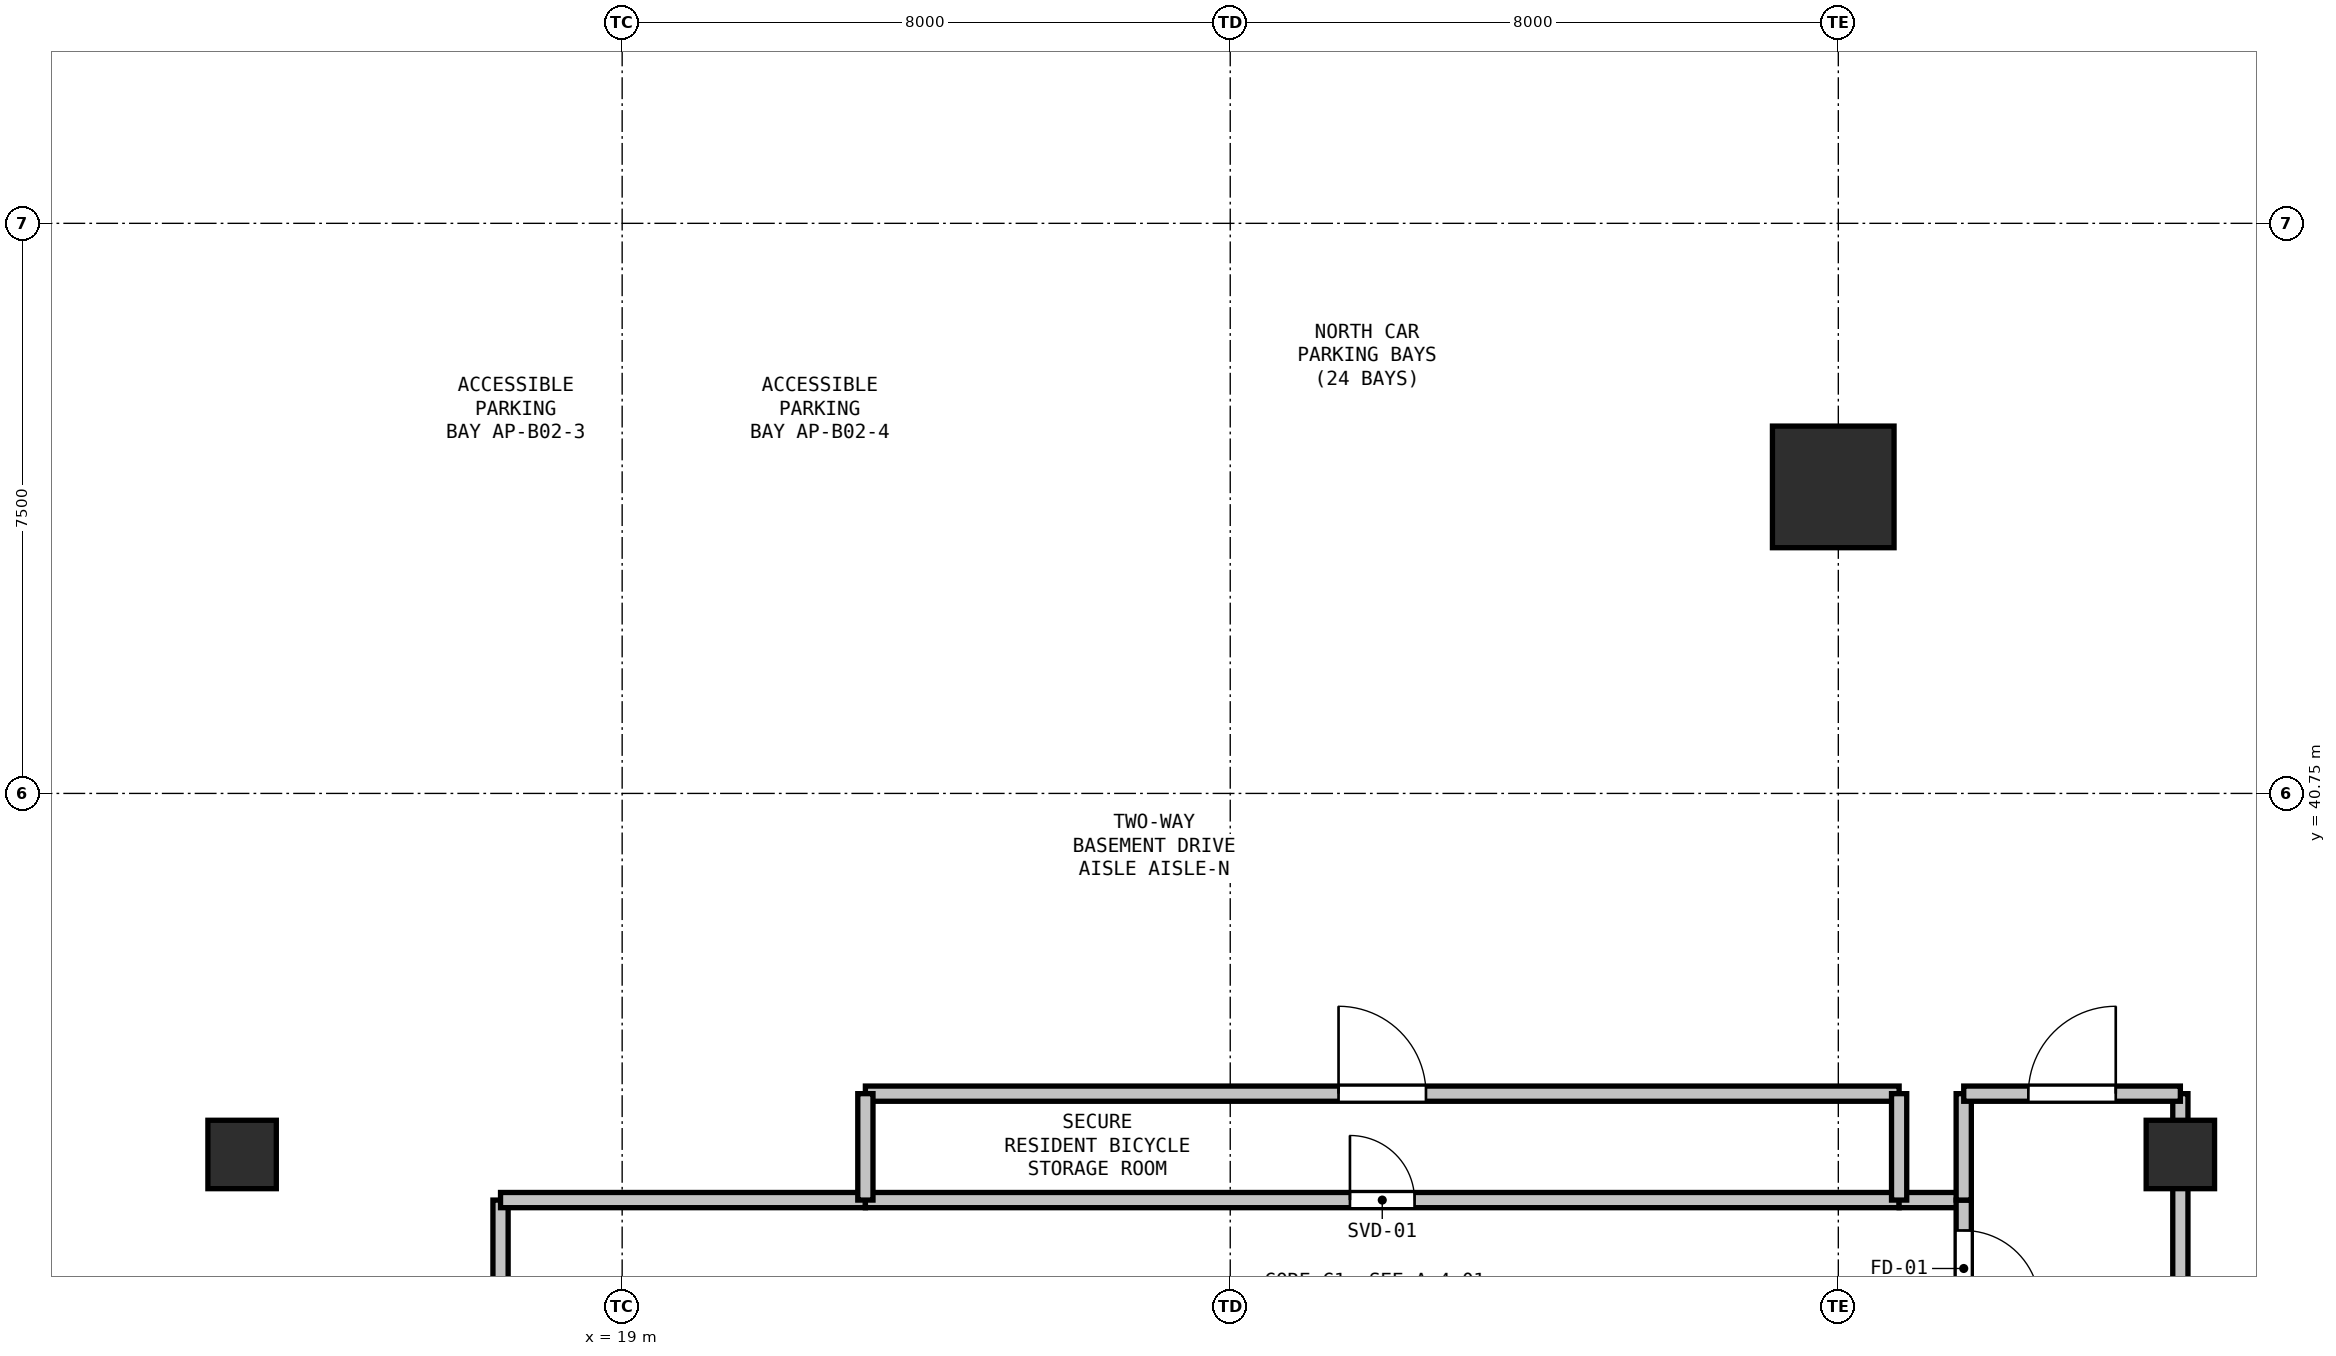
"""IFC4 building model, lengths in metres.
Left out: names, types, materials, properties, quantities, classifications, styles, units other than length and angle.
Written with IfcOpenShell. Run it as: python <this file> out.ifc"""

import sys

from ifc_helpers import new_model, si_unit, direction, frame, frame_2d, origin, origin_2d, place, context, subcontext, project, spatial, rectangle, hollow_rectangle, extrude, element, fill, save


model = new_model("IFC4")
c1 = context("Model", 3, precision=1e-05, world=origin(), true_north=direction((0.0, 1.0)))
c2 = subcontext(c1, "Body", "Model", "MODEL_VIEW")
j1 = project(units=[si_unit("LENGTHUNIT", "METRE"), si_unit("PLANEANGLEUNIT", "RADIAN")], contexts=[c1])
p1 = place(None, origin())
s1 = spatial("IfcSite", under=j1, at=p1, CompositionType="ELEMENT")
p2 = place(p1, origin())
s2 = spatial("IfcBuilding", under=s1, at=p2, CompositionType="ELEMENT")
p3 = place(p2, frame((0.0, 0.0, -9.0)))
s3 = spatial("IfcBuildingStorey", under=s2, at=p3, CompositionType="ELEMENT", Elevation=-9.0)
p4 = place(p3, frame((34.933, 44.783, 0.0), z_axis=(0.0, 0.0, 1.0), x_axis=(1.0, 0.0, 0.0)))
e1 = element("IfcColumn", 1, at=p4, inside=s3, PredefinedType="COLUMN", context=c2, shape_type="SweptSolid", body=[
    extrude(hollow_rectangle(XDim=1.6, YDim=1.6, WallThickness=0.04, at=origin_2d()), origin(), (0.0, 0.0, 1.0), 4.5),
])
for number, where, z_axis, x_axis in (
    (2, (14.0, 36.0, 0.0), (0.0, 0.0, 1.0), (1.0, 0.0, 0.0)),
    (3, (39.5, 36.0, 0.0), (0.0, 0.0, 1.0), (1.0, 0.0, 0.0)),
):
    element("IfcColumn", number, at=place(p3, frame(where, z_axis=z_axis, x_axis=x_axis)), inside=s3, PredefinedType="COLUMN", context=c2, shape_type="SweptSolid", body=[
        extrude(rectangle(XDim=0.9, YDim=0.9, at=origin_2d()), origin(), (0.0, 0.0, 1.0), 4.5),
    ])
p5 = place(p3, frame((17.4, 16.7, 0.0), z_axis=(0.0, 0.0, 1.0), x_axis=(0.0, 1.0, 0.0)))
e4 = element("IfcWall", 4, at=p5, inside=s3, PredefinedType="PARTITIONING", context=c2, shape_type="SweptSolid", body=[
    extrude(rectangle(XDim=18.7, YDim=0.2, at=frame_2d((9.35, 0.0))), origin(), (0.0, 0.0, 1.0), 4.2),
])
p6 = place(p5, frame((1.725, 0.0, 0.0)))
e5 = element("IfcOpeningElement", 5, at=p6, cuts=e4, PredefinedType="OPENING", context=c2, shape_type="SweptSolid", body=[
    extrude(rectangle(XDim=1.15, YDim=2.15, at=frame_2d((0.575, 1.075))), frame((0.0, 0.11, 0.0), z_axis=(0.0, -1.0, 0.0), x_axis=(1.0, 0.0, 0.0)), (0.0, 0.0, 1.0), 0.22),
])
p7 = place(p5, frame((5.347, 0.0, 0.0)))
e6 = element("IfcOpeningElement", 6, at=p7, cuts=e4, PredefinedType="OPENING", context=c2, shape_type="SweptSolid", body=[
    extrude(rectangle(XDim=1.15, YDim=2.15, at=frame_2d((0.575, 1.075))), frame((0.0, 0.11, 0.0), z_axis=(0.0, -1.0, 0.0), x_axis=(1.0, 0.0, 0.0)), (0.0, 0.0, 1.0), 0.22),
])
p8 = place(p3, frame((17.4, 35.4, 0.0), z_axis=(0.0, 0.0, 1.0), x_axis=(1.0, 0.0, 0.0)))
e7 = element("IfcWall", 7, at=p8, inside=s3, PredefinedType="PARTITIONING", context=c2, shape_type="SweptSolid", body=[
    extrude(rectangle(XDim=4.8, YDim=0.2, at=frame_2d((2.4, 0.0))), origin(), (0.0, 0.0, 1.0), 4.2),
])
p9 = place(p3, frame((22.2, 35.4, 0.0), z_axis=(0.0, 0.0, 1.0), x_axis=(1.0, 0.0, 0.0)))
e8 = element("IfcWall", 8, at=p9, inside=s3, PredefinedType="PARTITIONING", context=c2, shape_type="SweptSolid", body=[
    extrude(rectangle(XDim=13.6, YDim=0.2, at=frame_2d((6.8, 0.0))), origin(), (0.0, 0.0, 1.0), 4.2),
])
p10 = place(p9, frame((6.375, 0.0, 0.0)))
e9 = element("IfcOpeningElement", 9, at=p10, cuts=e8, PredefinedType="OPENING", context=c2, shape_type="SweptSolid", body=[
    extrude(rectangle(XDim=0.85, YDim=2.1, at=frame_2d((0.425, 1.05))), frame((0.0, 0.11, 0.0), z_axis=(0.0, -1.0, 0.0), x_axis=(1.0, 0.0, 0.0)), (0.0, 0.0, 1.0), 0.22),
])
p11 = place(p3, frame((35.8, 35.4, 0.0), z_axis=(0.0, 0.0, 1.0), x_axis=(1.0, 0.0, 0.0)))
e10 = element("IfcWall", 10, at=p11, inside=s3, PredefinedType="PARTITIONING", context=c2, shape_type="SweptSolid", body=[
    extrude(rectangle(XDim=0.85, YDim=0.2, at=frame_2d((0.425, 0.0))), origin(), (0.0, 0.0, 1.0), 4.2),
])
p12 = place(p3, frame((36.65, 35.4, 0.0), z_axis=(0.0, 0.0, 1.0), x_axis=(0.0, -1.0, 0.0)))
e11 = element("IfcWall", 11, at=p12, inside=s3, PredefinedType="PARTITIONING", context=c2, shape_type="SweptSolid", body=[
    extrude(rectangle(XDim=1.8, YDim=0.2, at=frame_2d((0.9, 0.0))), origin(), (0.0, 0.0, 1.0), 4.2),
])
p13 = place(p12, frame((0.4, 0.0, 0.0)))
e12 = element("IfcOpeningElement", 12, at=p13, cuts=e11, PredefinedType="OPENING", context=c2, shape_type="SweptSolid", body=[
    extrude(rectangle(XDim=1.0, YDim=2.15, at=frame_2d((0.5, 1.075))), frame((0.0, 0.11, 0.0), z_axis=(0.0, -1.0, 0.0), x_axis=(1.0, 0.0, 0.0)), (0.0, 0.0, 1.0), 0.22),
])
p14 = place(p3, frame((39.5, 36.8, 0.0), z_axis=(0.0, 0.0, 1.0), x_axis=(0.0, -1.0, 0.0)))
e13 = element("IfcWall", 13, at=p14, inside=s3, PredefinedType="PARTITIONING", context=c2, shape_type="SweptSolid", body=[
    extrude(rectangle(XDim=20.1, YDim=0.2, at=frame_2d((10.05, 0.0))), origin(), (0.0, 0.0, 1.0), 4.2),
])
p15 = place(p14, frame((10.884, 0.0, 0.0)))
e14 = element("IfcOpeningElement", 14, at=p15, cuts=e13, PredefinedType="OPENING", context=c2, shape_type="SweptSolid", body=[
    extrude(rectangle(XDim=1.15, YDim=2.15, at=frame_2d((0.575, 1.075))), frame((0.0, 0.11, 0.0), z_axis=(0.0, -1.0, 0.0), x_axis=(1.0, 0.0, 0.0)), (0.0, 0.0, 1.0), 0.22),
])
p16 = place(p3, frame((36.65, 35.4, 0.0), z_axis=(0.0, 0.0, 1.0), x_axis=(0.0, 1.0, 0.0)))
e15 = element("IfcWall", 15, at=p16, inside=s3, PredefinedType="PARTITIONING", context=c2, shape_type="SweptSolid", body=[
    extrude(rectangle(XDim=1.4, YDim=0.2, at=frame_2d((0.7, 0.0))), origin(), (0.0, 0.0, 1.0), 4.2),
])
p17 = place(p3, frame((36.65, 36.8, 0.0), z_axis=(0.0, 0.0, 1.0), x_axis=(1.0, 0.0, 0.0)))
e16 = element("IfcWall", 16, at=p17, inside=s3, PredefinedType="PARTITIONING", context=c2, shape_type="SweptSolid", body=[
    extrude(rectangle(XDim=2.85, YDim=0.2, at=frame_2d((1.425, 0.0))), origin(), (0.0, 0.0, 1.0), 4.2),
])
p18 = place(p17, frame((0.85, 0.0, 0.0)))
e17 = element("IfcOpeningElement", 17, at=p18, cuts=e16, PredefinedType="OPENING", context=c2, shape_type="SweptSolid", body=[
    extrude(rectangle(XDim=1.15, YDim=2.15, at=frame_2d((0.575, 1.075))), frame((0.0, 0.11, 0.0), z_axis=(0.0, -1.0, 0.0), x_axis=(1.0, 0.0, 0.0)), (0.0, 0.0, 1.0), 0.22),
])
p19 = place(p3, frame((22.2, 36.8, 0.0), z_axis=(0.0, 0.0, 1.0), x_axis=(1.0, 0.0, 0.0)))
e18 = element("IfcWall", 18, at=p19, inside=s3, PredefinedType="PARTITIONING", context=c2, shape_type="SweptSolid", body=[
    extrude(rectangle(XDim=13.6, YDim=0.2, at=frame_2d((6.8, 0.0))), origin(), (0.0, 0.0, 1.0), 4.2),
])
p20 = place(p19, frame((6.225, 0.0, 0.0)))
e19 = element("IfcOpeningElement", 19, at=p20, cuts=e18, PredefinedType="OPENING", context=c2, shape_type="SweptSolid", body=[
    extrude(rectangle(XDim=1.15, YDim=2.15, at=frame_2d((0.575, 1.075))), frame((0.0, 0.11, 0.0), z_axis=(0.0, -1.0, 0.0), x_axis=(1.0, 0.0, 0.0)), (0.0, 0.0, 1.0), 0.22),
])
for number, where, z_axis, x_axis in (
    (20, (35.8, 36.8, 0.0), (0.0, 0.0, 1.0), (0.0, -1.0, 0.0)),
    (21, (22.2, 35.4, 0.0), (0.0, 0.0, 1.0), (0.0, 1.0, 0.0)),
):
    element("IfcWall", number, at=place(p3, frame(where, z_axis=z_axis, x_axis=x_axis)), inside=s3, PredefinedType="PARTITIONING", context=c2, shape_type="SweptSolid", body=[
        extrude(rectangle(XDim=1.4, YDim=0.2, at=frame_2d((0.7, 0.0))), origin(), (0.0, 0.0, 1.0), 4.2),
    ])
p21 = place(p13, origin())
e22 = element("IfcDoor", 22, at=p21, inside=s3, OperationType="SINGLE_SWING_RIGHT", PredefinedType="DOOR", context=c2, shape_type="SweptSolid", body=[
    extrude(rectangle(XDim=1.0, YDim=2.15, at=frame_2d((0.5, 1.075))), frame((0.0, 0.025, 0.0), z_axis=(0.0, -1.0, 0.0), x_axis=(1.0, 0.0, 0.0)), (0.0, 0.0, 1.0), 0.05),
])
fill(e12, e22)
p22 = place(p10, origin())
e23 = element("IfcDoor", 23, at=p22, inside=s3, OperationType="SINGLE_SWING_LEFT", PredefinedType="DOOR", context=c2, shape_type="SweptSolid", body=[
    extrude(rectangle(XDim=0.85, YDim=2.1, at=frame_2d((0.425, 1.05))), frame((0.0, 0.025, 0.0), z_axis=(0.0, -1.0, 0.0), x_axis=(1.0, 0.0, 0.0)), (0.0, 0.0, 1.0), 0.05),
])
fill(e9, e23)
p23 = place(p18, origin())
e24 = element("IfcDoor", 24, at=p23, inside=s3, OperationType="SINGLE_SWING_RIGHT", PredefinedType="DOOR", context=c2, shape_type="SweptSolid", body=[
    extrude(rectangle(XDim=1.15, YDim=2.15, at=frame_2d((0.575, 1.075))), frame((0.0, 0.025, 0.0), z_axis=(0.0, -1.0, 0.0), x_axis=(1.0, 0.0, 0.0)), (0.0, 0.0, 1.0), 0.05),
])
fill(e17, e24)
p24 = place(p20, origin())
e25 = element("IfcDoor", 25, at=p24, inside=s3, OperationType="SINGLE_SWING_LEFT", PredefinedType="DOOR", context=c2, shape_type="SweptSolid", body=[
    extrude(rectangle(XDim=1.15, YDim=2.15, at=frame_2d((0.575, 1.075))), frame((0.0, 0.025, 0.0), z_axis=(0.0, -1.0, 0.0), x_axis=(1.0, 0.0, 0.0)), (0.0, 0.0, 1.0), 0.05),
])
fill(e19, e25)
save(model, sys.argv[1])
